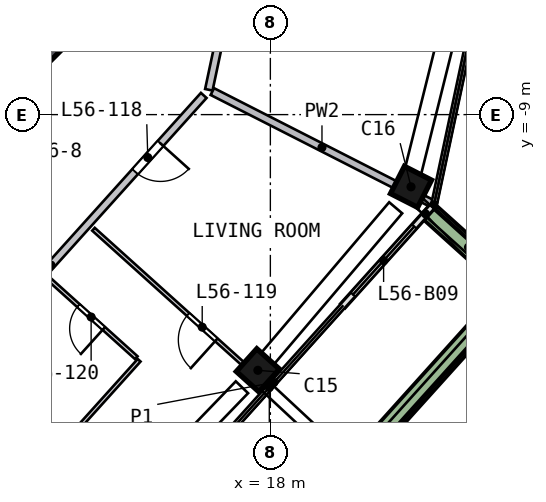
"""IFC4 building model, lengths in metres.
Left out: names, types, materials, properties, quantities, classifications, styles, units other than length and angle.
Written with IfcOpenShell. Run it as: python <this file> out.ifc"""

import sys

from ifc_helpers import new_model, si_unit, direction, frame, frame_2d, origin, origin_2d, place, context, subcontext, project, spatial, rectangle, extrude, element, fill, save


model = new_model("IFC4")
c1 = context("Model", 3, precision=1e-05, world=origin(), true_north=direction((0.0, 1.0)))
c2 = subcontext(c1, "Body", "Model", "MODEL_VIEW")
j1 = project(units=[si_unit("LENGTHUNIT", "METRE"), si_unit("PLANEANGLEUNIT", "RADIAN")], contexts=[c1])
p1 = place(None, origin())
s1 = spatial("IfcSite", under=j1, at=p1, CompositionType="ELEMENT")
p2 = place(p1, origin())
s2 = spatial("IfcBuilding", under=s1, at=p2, CompositionType="ELEMENT")
p3 = place(p2, frame((0.0, 0.0, 230.5)))
s3 = spatial("IfcBuildingStorey", under=s2, at=p3, CompositionType="ELEMENT", Elevation=230.5)
p4 = place(p3, frame((17.582, -15.831, 0.0), z_axis=(0.074603375, 0.084261508, 0.993646987), x_axis=(0.664972628, 0.738340463, -0.112537837)))
e1 = element("IfcColumn", 1, at=p4, inside=s3, PredefinedType="COLUMN", context=c2, shape_type="SweptSolid", body=[
    extrude(rectangle(XDim=0.8, YDim=0.8, at=origin_2d()), origin(), (0.0, 0.0, 1.0), 3.21),
])
p5 = place(p3, frame((21.639, -11.025, 0.0), z_axis=(0.051543375, 0.103314818, 0.993312302), x_axis=(-0.450968307, -0.885041164, 0.11545442)))
e2 = element("IfcColumn", 2, at=p5, inside=s3, PredefinedType="COLUMN", context=c2, shape_type="SweptSolid", body=[
    extrude(rectangle(XDim=0.8, YDim=0.8, at=origin_2d()), origin(), (0.0, 0.0, 1.0), 3.211),
])
p6 = place(p3, frame((5.622, -13.823, 0.0), z_axis=(0.0, 0.0, 1.0), x_axis=(0.707106781, 0.707106781, 0.0)))
e3 = element("IfcWall", 3, at=p6, inside=s3, PredefinedType="SHEAR", context=c2, shape_type="SweptSolid", body=[
    extrude(rectangle(XDim=11.598, YDim=0.5, at=frame_2d((5.799, 0.0))), origin(), (0.0, 0.0, 1.0), 3.5),
])
p7 = place(p6, frame((2.099, 0.0, 0.0)))
e4 = element("IfcOpeningElement", 4, at=p7, cuts=e3, PredefinedType="OPENING", context=c2, shape_type="SweptSolid", body=[
    extrude(rectangle(XDim=1.2, YDim=2.1, at=frame_2d((0.6, 1.05))), frame((0.0, 0.26, 0.0), z_axis=(0.0, -1.0, 0.0), x_axis=(1.0, 0.0, 0.0)), (0.0, 0.0, 1.0), 0.52),
])
p8 = place(p3, frame((19.909, -14.03, 0.0), z_axis=(0.0, 0.0, 1.0), x_axis=(0.669103303, 0.743169409, 0.0)))
e5 = element("IfcWall", 5, at=p8, inside=s3, PredefinedType="SOLIDWALL", context=c2, shape_type="SweptSolid", body=[
    extrude(rectangle(XDim=3.504, YDim=0.15, at=frame_2d((1.752, 0.0))), origin(), (0.0, 0.0, 1.0), 2.525),
])
p9 = place(p8, frame((0.4, 0.0, 0.0)))
e6 = element("IfcOpeningElement", 6, at=p9, cuts=e5, PredefinedType="OPENING", context=c2, shape_type="SweptSolid", body=[
    extrude(rectangle(XDim=2.4, YDim=2.4, at=frame_2d((1.2, 1.2))), frame((0.0, 0.085, 0.0), z_axis=(0.0, -1.0, 0.0), x_axis=(1.0, 0.0, 0.0)), (0.0, 0.0, 1.0), 0.17),
])
p10 = place(p3, frame((15.386, -23.574, 0.0), z_axis=(0.0, 0.0, 1.0), x_axis=(0.669134751, 0.743141094, 0.0)))
e7 = element("IfcWall", 7, at=p10, inside=s3, PredefinedType="SOLIDWALL", context=c2, shape_type="SweptSolid", body=[
    extrude(rectangle(XDim=13.723, YDim=0.5, at=frame_2d((6.862, 0.0))), origin(), (0.0, 0.0, 1.0), 0.7),
])
p11 = place(p3, frame((24.216, -13.394, 0.0), z_axis=(0.0, 0.0, 1.0), x_axis=(-0.743132215, 0.669144611, 0.0)))
e8 = element("IfcWall", 8, at=p11, inside=s3, PredefinedType="SOLIDWALL", context=c2, shape_type="SweptSolid", body=[
    extrude(rectangle(XDim=2.699, YDim=0.5, at=frame_2d((1.35, 0.0))), origin(), (0.0, 0.0, 1.0), 0.7),
])
p12 = place(p3, frame((16.247, -8.495, 0.0), z_axis=(0.0, 0.0, 1.0), x_axis=(-0.669127468, -0.743147652, 0.0)))
e9 = element("IfcWall", 9, at=p12, inside=s3, PredefinedType="SOLIDWALL", context=c2, shape_type="SweptSolid", body=[
    extrude(rectangle(XDim=9.116, YDim=0.2, at=frame_2d((4.558, 0.0))), origin(), (0.0, 0.0, 1.0), 3.19),
])
p13 = place(p12, frame((1.7, 0.0, 0.0)))
e10 = element("IfcOpeningElement", 10, at=p13, cuts=e9, PredefinedType="OPENING", context=c2, shape_type="SweptSolid", body=[
    extrude(rectangle(XDim=1.0, YDim=2.1, at=frame_2d((0.5, 1.05))), frame((0.0, 0.11, 0.0), z_axis=(0.0, -1.0, 0.0), x_axis=(1.0, 0.0, 0.0)), (0.0, 0.0, 1.0), 0.22),
])
p14 = place(p3, frame((18.318, 0.767, 0.0), z_axis=(0.0, 0.0, 1.0), x_axis=(-0.207909214, -0.978148127, 0.0)))
e11 = element("IfcWall", 11, at=p14, inside=s3, PredefinedType="SOLIDWALL", context=c2, shape_type="SweptSolid", body=[
    extrude(rectangle(XDim=9.317, YDim=0.2, at=frame_2d((4.658, 0.0))), origin(), (0.0, 0.0, 1.0), 3.19),
])
p15 = place(p14, frame((6.458, 0.0, 0.0)))
e12 = element("IfcOpeningElement", 12, at=p15, cuts=e11, PredefinedType="OPENING", context=c2, shape_type="SweptSolid", body=[
    extrude(rectangle(XDim=1.0, YDim=2.1, at=frame_2d((0.5, 1.05))), frame((0.0, 0.11, 0.0), z_axis=(0.0, -1.0, 0.0), x_axis=(1.0, 0.0, 0.0)), (0.0, 0.0, 1.0), 0.22),
])
p16 = place(p3, frame((16.473, -8.394, 0.0), z_axis=(0.0, 0.0, 1.0), x_axis=(0.891008422, -0.453986774, 0.0)))
e13 = element("IfcWall", 13, at=p16, inside=s3, PredefinedType="SOLIDWALL", context=c2, shape_type="SweptSolid", body=[
    extrude(rectangle(XDim=6.476, YDim=0.2, at=frame_2d((3.238, 0.0))), origin(), (0.0, 0.0, 1.0), 3.19),
])
p17 = place(p3, frame((12.069, -18.217, 0.0), z_axis=(0.0, 0.0, 1.0), x_axis=(0.669128583, 0.743146648, 0.0)))
e14 = element("IfcWall", 14, at=p17, inside=s3, PredefinedType="PARTITIONING", context=c2, shape_type="SweptSolid", body=[
    extrude(rectangle(XDim=3.704, YDim=0.1, at=frame_2d((1.852, 0.0))), origin(), (0.0, 0.0, 1.0), 3.19),
])
p18 = place(p3, frame((14.473, -15.397, 0.0), z_axis=(0.0, 0.0, 1.0), x_axis=(-0.74315315, 0.669121361, 0.0)))
e15 = element("IfcWall", 15, at=p18, inside=s3, PredefinedType="PARTITIONING", context=c2, shape_type="SweptSolid", body=[
    extrude(rectangle(XDim=3.1, YDim=0.1, at=frame_2d((1.55, 0.0))), origin(), (0.0, 0.0, 1.0), 3.19),
])
p19 = place(p18, frame((1.15, 0.0, 0.0)))
e16 = element("IfcOpeningElement", 16, at=p19, cuts=e15, PredefinedType="OPENING", context=c2, shape_type="SweptSolid", body=[
    extrude(rectangle(XDim=0.9, YDim=2.1, at=frame_2d((0.45, 1.05))), frame((0.0, 0.06, 0.0), z_axis=(0.0, -1.0, 0.0), x_axis=(1.0, 0.0, 0.0)), (0.0, 0.0, 1.0), 0.12),
])
p20 = place(p3, frame((17.916, -16.132, 0.0), z_axis=(0.0, 0.0, 1.0), x_axis=(-0.743155953, 0.669118247, 0.0)))
e17 = element("IfcWall", 17, at=p20, inside=s3, PredefinedType="PARTITIONING", context=c2, shape_type="SweptSolid", body=[
    extrude(rectangle(XDim=6.15, YDim=0.1, at=frame_2d((3.075, 0.0))), origin(), (0.0, 0.0, 1.0), 3.19),
])
p21 = place(p20, frame((1.8, 0.0, 0.0)))
e18 = element("IfcOpeningElement", 18, at=p21, cuts=e17, PredefinedType="OPENING", context=c2, shape_type="SweptSolid", body=[
    extrude(rectangle(XDim=1.0, YDim=2.1, at=frame_2d((0.5, 1.05))), frame((0.0, 0.06, 0.0), z_axis=(0.0, -1.0, 0.0), x_axis=(1.0, 0.0, 0.0)), (0.0, 0.0, 1.0), 0.12),
])
p22 = place(p9, origin())
e19 = element("IfcDoor", 19, at=p22, inside=s3, OperationType="SLIDING_TO_RIGHT", PredefinedType="DOOR", context=c2, shape_type="SweptSolid", body=[
    extrude(rectangle(XDim=2.4, YDim=2.4, at=frame_2d((1.2, 1.2))), frame((0.0, 0.025, 0.0), z_axis=(0.0, -1.0, 0.0), x_axis=(1.0, 0.0, 0.0)), (0.0, 0.0, 1.0), 0.05),
])
fill(e6, e19)
p23 = place(p13, origin())
e20 = element("IfcDoor", 20, at=p23, inside=s3, OperationType="SINGLE_SWING_LEFT", PredefinedType="DOOR", context=c2, shape_type="SweptSolid", body=[
    extrude(rectangle(XDim=1.0, YDim=2.1, at=frame_2d((0.5, 1.05))), frame((0.0, 0.025, 0.0), z_axis=(0.0, -1.0, 0.0), x_axis=(1.0, 0.0, 0.0)), (0.0, 0.0, 1.0), 0.05),
])
fill(e10, e20)
p24 = place(p21, origin())
e21 = element("IfcDoor", 21, at=p24, inside=s3, OperationType="SINGLE_SWING_LEFT", PredefinedType="DOOR", context=c2, shape_type="SweptSolid", body=[
    extrude(rectangle(XDim=1.0, YDim=2.1, at=frame_2d((0.5, 1.05))), frame((0.0, 0.025, 0.0), z_axis=(0.0, -1.0, 0.0), x_axis=(1.0, 0.0, 0.0)), (0.0, 0.0, 1.0), 0.05),
])
fill(e18, e21)
p25 = place(p19, origin())
e22 = element("IfcDoor", 22, at=p25, inside=s3, OperationType="SINGLE_SWING_LEFT", PredefinedType="DOOR", context=c2, shape_type="SweptSolid", body=[
    extrude(rectangle(XDim=0.9, YDim=2.1, at=frame_2d((0.45, 1.05))), frame((0.0, 0.025, 0.0), z_axis=(0.0, -1.0, 0.0), x_axis=(1.0, 0.0, 0.0)), (0.0, 0.0, 1.0), 0.05),
])
fill(e16, e22)
save(model, sys.argv[1])
